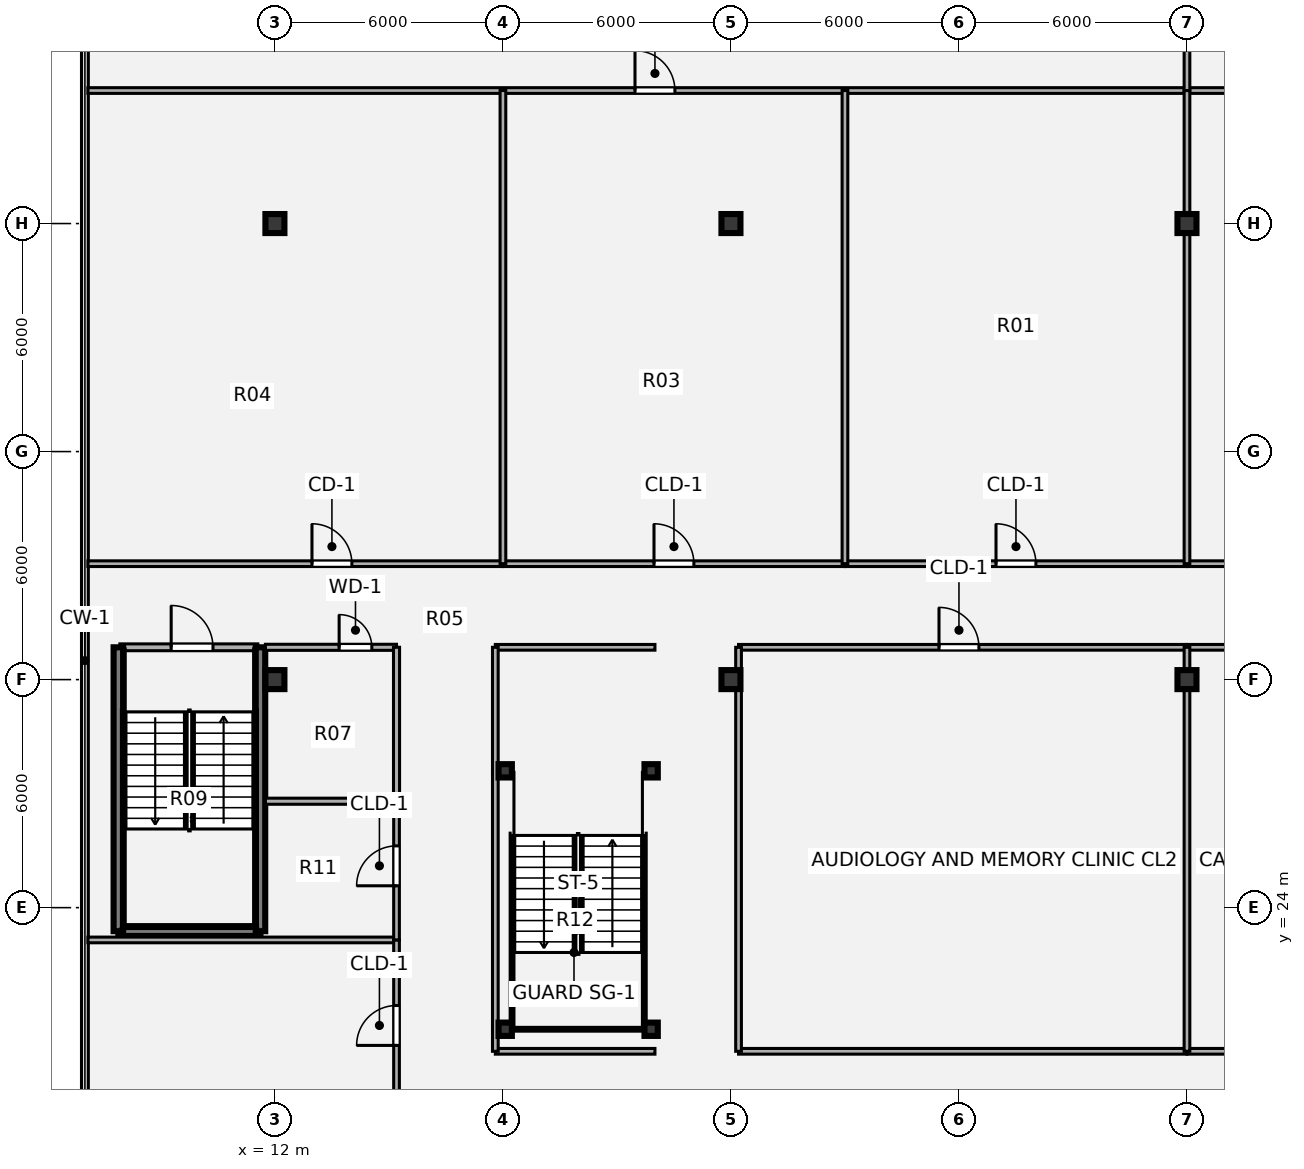
"""IFC4 building model, lengths in metres.
Left out: names, types, materials, properties, quantities, classifications, styles, units other than length and angle.
Written with IfcOpenShell. Run it as: python <this file> out.ifc"""

import sys

from ifc_helpers import new_model, si_unit, direction, frame, frame_2d, origin, origin_2d, place, context, subcontext, project, spatial, rectangle, hollow_rectangle, i_section, extrude, source, transform, mapped, element, fill, save


model = new_model("IFC4")
c1 = context("Model", 3, precision=1e-05, world=origin(), true_north=direction((0.0, 1.0)))
c2 = subcontext(c1, "Body", "Model", "MODEL_VIEW")
j1 = project(units=[si_unit("LENGTHUNIT", "METRE"), si_unit("PLANEANGLEUNIT", "RADIAN")], contexts=[c1])
p1 = place(None, origin())
s1 = spatial("IfcSite", under=j1, at=p1, CompositionType="ELEMENT")
p2 = place(p1, origin())
s2 = spatial("IfcBuilding", under=s1, at=p2, CompositionType="ELEMENT")
p3 = place(p2, frame((0.0, 0.0, 9.72)))
s3 = spatial("IfcBuildingStorey", under=s2, at=p3, CompositionType="ELEMENT", Elevation=9.72)
m1 = source(origin(), c2, "Body", "SweptSolid", [
    extrude(i_section(OverallWidth=0.5, OverallDepth=0.5, WebThickness=0.022, FlangeThickness=0.035, at=origin_2d()), origin(), (0.0, 0.0, 1.0), 4.32),
])
for number, where, z_axis, x_axis in (
    (1, (12.0, 30.0, 0.0), (0.0, 0.0, 1.0), (1.0, 0.0, 0.0)),
    (2, (24.0, 30.0, 0.0), (0.0, 0.0, 1.0), (1.0, 0.0, 0.0)),
    (3, (36.0, 30.0, 0.0), (0.0, 0.0, 1.0), (1.0, 0.0, 0.0)),
    (4, (12.0, 42.0, 0.0), (0.0, 0.0, 1.0), (1.0, 0.0, 0.0)),
    (5, (24.0, 42.0, 0.0), (0.0, 0.0, 1.0), (1.0, 0.0, 0.0)),
    (6, (36.0, 42.0, 0.0), (0.0, 0.0, 1.0), (1.0, 0.0, 0.0)),
):
    element("IfcColumn", number, at=place(p3, frame(where, z_axis=z_axis, x_axis=x_axis)), inside=s3, PredefinedType="COLUMN", context=c2, shape_type="MappedRepresentation", body=[
        mapped(m1, transform((0.0, 0.0, 0.0), x_axis=(1.0, 0.0, 0.0), y_axis=(0.0, 1.0, 0.0), z_axis=(0.0, 0.0, 1.0), scale=1.0)),
    ])
m2 = source(origin(), c2, "Body", "SweptSolid", [
    extrude(hollow_rectangle(XDim=0.35, YDim=0.35, WallThickness=0.016, OuterFilletRadius=0.032, at=origin_2d()), origin(), (0.0, 0.0, 1.0), 4.32),
])
for number, where, z_axis, x_axis in (
    (7, (18.06, 20.8, 0.0), (0.0, 0.0, 1.0), (1.0, 0.0, 0.0)),
    (8, (21.9, 20.8, 0.0), (0.0, 0.0, 1.0), (1.0, 0.0, 0.0)),
    (9, (18.06, 27.6, 0.0), (0.0, 0.0, 1.0), (1.0, 0.0, 0.0)),
    (10, (21.9, 27.6, 0.0), (0.0, 0.0, 1.0), (1.0, 0.0, 0.0)),
):
    element("IfcColumn", number, at=place(p3, frame(where, z_axis=z_axis, x_axis=x_axis)), inside=s3, PredefinedType="COLUMN", context=c2, shape_type="MappedRepresentation", body=[
        mapped(m2, transform((0.0, 0.0, 0.0), x_axis=(1.0, 0.0, 0.0), y_axis=(0.0, 1.0, 0.0), z_axis=(0.0, 0.0, 1.0), scale=1.0)),
    ])
p4 = place(p3, frame((7.92, 30.85, 0.0), z_axis=(0.0, 0.0, 1.0), x_axis=(1.0, 0.0, 0.0)))
e11 = element("IfcWall", 11, at=p4, inside=s3, PredefinedType="PARTITIONING", context=c2, shape_type="SweptSolid", body=[
    extrude(rectangle(XDim=3.63, YDim=0.18, at=frame_2d((1.815, 0.0))), origin(), (0.0, 0.0, 1.0), 4.04),
])
p5 = place(p4, frame((1.35, 0.0, 0.0)))
e12 = element("IfcOpeningElement", 12, at=p5, cuts=e11, PredefinedType="OPENING", context=c2, shape_type="SweptSolid", body=[
    extrude(rectangle(XDim=1.1, YDim=2.1, at=origin_2d()), frame((0.55, 0.1, 1.05), z_axis=(0.0, -1.0, 0.0), x_axis=(1.0, 0.0, 0.0)), (0.0, 0.0, 1.0), 0.2),
])
p6 = place(p3, frame((7.88, 23.38, 0.0), z_axis=(0.0, 0.0, 1.0), x_axis=(1.0, 0.0, 0.0)))
e13 = element("IfcWall", 13, at=p6, inside=s3, PredefinedType="SHEAR", context=c2, shape_type="SweptSolid", body=[
    extrude(rectangle(XDim=3.74, YDim=0.25, at=frame_2d((1.87, 0.0))), origin(), (0.0, 0.0, 1.0), 4.32),
])
for number, where, z_axis, x_axis in (
    (14, (7.88, 23.38, 0.0), (0.0, 0.0, 1.0), (0.0, 1.0, 0.0)),
    (15, (11.62, 23.38, 0.0), (0.0, 0.0, 1.0), (0.0, 1.0, 0.0)),
):
    element("IfcWall", number, at=place(p3, frame(where, z_axis=z_axis, x_axis=x_axis)), inside=s3, PredefinedType="SHEAR", context=c2, shape_type="SweptSolid", body=[
        extrude(rectangle(XDim=7.47, YDim=0.25, at=frame_2d((3.735, 0.0))), origin(), (0.0, 0.0, 1.0), 4.32),
    ])
p7 = place(p3, frame((17.8, 20.22, 0.0), z_axis=(0.0, 0.0, 1.0), x_axis=(1.0, 0.0, 0.0)))
e16 = element("IfcWall", 16, at=p7, inside=s3, PredefinedType="PARTITIONING", context=c2, shape_type="SweptSolid", body=[
    extrude(rectangle(XDim=4.2, YDim=0.15, at=frame_2d((2.1, 0.0))), origin(), (0.0, 0.0, 1.0), 4.01),
])
for number, where, z_axis, x_axis in (
    (17, (24.2, 20.22, 0.0), (0.0, 0.0, 1.0), (1.0, 0.0, 0.0)),
    (18, (36.0, 20.22, 0.0), (0.0, 0.0, 1.0), (1.0, 0.0, 0.0)),
):
    element("IfcWall", number, at=place(p3, frame(where, z_axis=z_axis, x_axis=x_axis)), inside=s3, PredefinedType="PARTITIONING", context=c2, shape_type="SweptSolid", body=[
        extrude(rectangle(XDim=11.8, YDim=0.15, at=frame_2d((5.9, 0.0))), origin(), (0.0, 0.0, 1.0), 4.01),
    ])
p8 = place(p3, frame((7.08, 23.15, 0.0), z_axis=(0.0, 0.0, 1.0), x_axis=(1.0, 0.0, 0.0)))
e19 = element("IfcWall", 19, at=p8, inside=s3, PredefinedType="PARTITIONING", context=c2, shape_type="SweptSolid", body=[
    extrude(rectangle(XDim=8.12, YDim=0.15, at=frame_2d((4.06, 0.0))), origin(), (0.0, 0.0, 1.0), 4.01),
])
p9 = place(p3, frame((11.75, 26.8, 0.0), z_axis=(0.0, 0.0, 1.0), x_axis=(1.0, 0.0, 0.0)))
e20 = element("IfcWall", 20, at=p9, inside=s3, PredefinedType="PLUMBINGWALL", context=c2, shape_type="SweptSolid", body=[
    extrude(rectangle(XDim=3.45, YDim=0.16, at=frame_2d((1.725, 0.0))), origin(), (0.0, 0.0, 1.0), 4.01),
])
p10 = place(p3, frame((11.75, 30.85, 0.0), z_axis=(0.0, 0.0, 1.0), x_axis=(1.0, 0.0, 0.0)))
e21 = element("IfcWall", 21, at=p10, inside=s3, PredefinedType="PLUMBINGWALL", context=c2, shape_type="SweptSolid", body=[
    extrude(rectangle(XDim=3.45, YDim=0.16, at=frame_2d((1.725, 0.0))), origin(), (0.0, 0.0, 1.0), 4.01),
])
p11 = place(p10, frame((1.94, 0.0, 0.0)))
e22 = element("IfcOpeningElement", 22, at=p11, cuts=e21, PredefinedType="OPENING", context=c2, shape_type="SweptSolid", body=[
    extrude(rectangle(XDim=0.86, YDim=2.1, at=origin_2d()), frame((0.43, 0.09, 1.05), z_axis=(0.0, -1.0, 0.0), x_axis=(1.0, 0.0, 0.0)), (0.0, 0.0, 1.0), 0.18),
])
p12 = place(p3, frame((17.8, 30.85, 0.0), z_axis=(0.0, 0.0, 1.0), x_axis=(1.0, 0.0, 0.0)))
e23 = element("IfcWall", 23, at=p12, inside=s3, PredefinedType="PARTITIONING", context=c2, shape_type="SweptSolid", body=[
    extrude(rectangle(XDim=4.2, YDim=0.15, at=frame_2d((2.1, 0.0))), origin(), (0.0, 0.0, 1.0), 4.01),
])
p13 = place(p3, frame((24.2, 30.85, 0.0), z_axis=(0.0, 0.0, 1.0), x_axis=(1.0, 0.0, 0.0)))
e24 = element("IfcWall", 24, at=p13, inside=s3, PredefinedType="PARTITIONING", context=c2, shape_type="SweptSolid", body=[
    extrude(rectangle(XDim=11.8, YDim=0.15, at=frame_2d((5.9, 0.0))), origin(), (0.0, 0.0, 1.0), 4.01),
])
p14 = place(p13, frame((5.275, 0.0, 0.0)))
e25 = element("IfcOpeningElement", 25, at=p14, cuts=e24, PredefinedType="OPENING", context=c2, shape_type="SweptSolid", body=[
    extrude(rectangle(XDim=1.05, YDim=2.1, at=origin_2d()), frame((0.525, 0.085, 1.05), z_axis=(0.0, -1.0, 0.0), x_axis=(1.0, 0.0, 0.0)), (0.0, 0.0, 1.0), 0.17),
])
p15 = place(p3, frame((36.0, 30.85, 0.0), z_axis=(0.0, 0.0, 1.0), x_axis=(1.0, 0.0, 0.0)))
e26 = element("IfcWall", 26, at=p15, inside=s3, PredefinedType="PARTITIONING", context=c2, shape_type="SweptSolid", body=[
    extrude(rectangle(XDim=11.8, YDim=0.15, at=frame_2d((5.9, 0.0))), origin(), (0.0, 0.0, 1.0), 4.01),
])
p16 = place(p15, frame((5.475, 0.0, 0.0)))
e27 = element("IfcOpeningElement", 27, at=p16, cuts=e26, PredefinedType="OPENING", context=c2, shape_type="SweptSolid", body=[
    extrude(rectangle(XDim=1.05, YDim=2.1, at=origin_2d()), frame((0.525, 0.085, 1.05), z_axis=(0.0, -1.0, 0.0), x_axis=(1.0, 0.0, 0.0)), (0.0, 0.0, 1.0), 0.17),
])
p17 = place(p3, frame((7.08, 33.05, 0.0), z_axis=(0.0, 0.0, 1.0), x_axis=(1.0, 0.0, 0.0)))
e28 = element("IfcWall", 28, at=p17, inside=s3, PredefinedType="PARTITIONING", context=c2, shape_type="SweptSolid", body=[
    extrude(rectangle(XDim=10.92, YDim=0.15, at=frame_2d((5.46, 0.0))), origin(), (0.0, 0.0, 1.0), 4.01),
])
p18 = place(p17, frame((5.895, 0.0, 0.0)))
e29 = element("IfcOpeningElement", 29, at=p18, cuts=e28, PredefinedType="OPENING", context=c2, shape_type="SweptSolid", body=[
    extrude(rectangle(XDim=1.05, YDim=2.1, at=origin_2d()), frame((0.525, 0.085, 1.05), z_axis=(0.0, -1.0, 0.0), x_axis=(1.0, 0.0, 0.0)), (0.0, 0.0, 1.0), 0.17),
])
p19 = place(p3, frame((18.0, 33.05, 0.0), z_axis=(0.0, 0.0, 1.0), x_axis=(1.0, 0.0, 0.0)))
e30 = element("IfcWall", 30, at=p19, inside=s3, PredefinedType="PARTITIONING", context=c2, shape_type="SweptSolid", body=[
    extrude(rectangle(XDim=9.0, YDim=0.15, at=frame_2d((4.5, 0.0))), origin(), (0.0, 0.0, 1.0), 4.01),
])
p20 = place(p19, frame((3.975, 0.0, 0.0)))
e31 = element("IfcOpeningElement", 31, at=p20, cuts=e30, PredefinedType="OPENING", context=c2, shape_type="SweptSolid", body=[
    extrude(rectangle(XDim=1.05, YDim=2.1, at=origin_2d()), frame((0.525, 0.085, 1.05), z_axis=(0.0, -1.0, 0.0), x_axis=(1.0, 0.0, 0.0)), (0.0, 0.0, 1.0), 0.17),
])
p21 = place(p3, frame((27.0, 33.05, 0.0), z_axis=(0.0, 0.0, 1.0), x_axis=(1.0, 0.0, 0.0)))
e32 = element("IfcWall", 32, at=p21, inside=s3, PredefinedType="PARTITIONING", context=c2, shape_type="SweptSolid", body=[
    extrude(rectangle(XDim=9.0, YDim=0.15, at=frame_2d((4.5, 0.0))), origin(), (0.0, 0.0, 1.0), 4.01),
])
p22 = place(p21, frame((3.975, 0.0, 0.0)))
e33 = element("IfcOpeningElement", 33, at=p22, cuts=e32, PredefinedType="OPENING", context=c2, shape_type="SweptSolid", body=[
    extrude(rectangle(XDim=1.05, YDim=2.1, at=origin_2d()), frame((0.525, 0.085, 1.05), z_axis=(0.0, -1.0, 0.0), x_axis=(1.0, 0.0, 0.0)), (0.0, 0.0, 1.0), 0.17),
])
p23 = place(p3, frame((36.0, 33.05, 0.0), z_axis=(0.0, 0.0, 1.0), x_axis=(1.0, 0.0, 0.0)))
e34 = element("IfcWall", 34, at=p23, inside=s3, PredefinedType="PARTITIONING", context=c2, shape_type="SweptSolid", body=[
    extrude(rectangle(XDim=9.0, YDim=0.15, at=frame_2d((4.5, 0.0))), origin(), (0.0, 0.0, 1.0), 4.01),
])
p24 = place(p23, frame((3.975, 0.0, 0.0)))
e35 = element("IfcOpeningElement", 35, at=p24, cuts=e34, PredefinedType="OPENING", context=c2, shape_type="SweptSolid", body=[
    extrude(rectangle(XDim=1.05, YDim=2.1, at=origin_2d()), frame((0.525, 0.085, 1.05), z_axis=(0.0, -1.0, 0.0), x_axis=(1.0, 0.0, 0.0)), (0.0, 0.0, 1.0), 0.17),
])
p25 = place(p3, frame((7.08, 45.5, 0.0), z_axis=(0.0, 0.0, 1.0), x_axis=(1.0, 0.0, 0.0)))
e36 = element("IfcWall", 36, at=p25, inside=s3, PredefinedType="PARTITIONING", context=c2, shape_type="SweptSolid", body=[
    extrude(rectangle(XDim=28.92, YDim=0.15, at=frame_2d((14.46, 0.0))), origin(), (0.0, 0.0, 1.0), 4.01),
])
p26 = place(p25, frame((14.395, 0.0, 0.0)))
e37 = element("IfcOpeningElement", 37, at=p26, cuts=e36, PredefinedType="OPENING", context=c2, shape_type="SweptSolid", body=[
    extrude(rectangle(XDim=1.05, YDim=2.1, at=origin_2d()), frame((0.525, 0.085, 1.05), z_axis=(0.0, -1.0, 0.0), x_axis=(1.0, 0.0, 0.0)), (0.0, 0.0, 1.0), 0.17),
])
p27 = place(p3, frame((36.0, 45.5, 0.0), z_axis=(0.0, 0.0, 1.0), x_axis=(1.0, 0.0, 0.0)))
e38 = element("IfcWall", 38, at=p27, inside=s3, PredefinedType="PARTITIONING", context=c2, shape_type="SweptSolid", body=[
    extrude(rectangle(XDim=28.92, YDim=0.15, at=frame_2d((14.46, 0.0))), origin(), (0.0, 0.0, 1.0), 4.01),
])
p28 = place(p27, frame((3.975, 0.0, 0.0)))
e39 = element("IfcOpeningElement", 39, at=p28, cuts=e38, PredefinedType="OPENING", context=c2, shape_type="SweptSolid", body=[
    extrude(rectangle(XDim=1.05, YDim=2.1, at=origin_2d()), frame((0.525, 0.085, 1.05), z_axis=(0.0, -1.0, 0.0), x_axis=(1.0, 0.0, 0.0)), (0.0, 0.0, 1.0), 0.17),
])
p29 = place(p3, frame((15.2, 6.2, 0.0), z_axis=(0.0, 0.0, 1.0), x_axis=(0.0, 1.0, 0.0)))
e40 = element("IfcWall", 40, at=p29, inside=s3, PredefinedType="PARTITIONING", context=c2, shape_type="SweptSolid", body=[
    extrude(rectangle(XDim=16.95, YDim=0.15, at=frame_2d((8.475, 0.0))), origin(), (0.0, 0.0, 1.0), 4.01),
])
p30 = place(p29, frame((14.175, 0.0, 0.0)))
e41 = element("IfcOpeningElement", 41, at=p30, cuts=e40, PredefinedType="OPENING", context=c2, shape_type="SweptSolid", body=[
    extrude(rectangle(XDim=1.05, YDim=2.1, at=origin_2d()), frame((0.525, 0.085, 1.05), z_axis=(0.0, -1.0, 0.0), x_axis=(1.0, 0.0, 0.0)), (0.0, 0.0, 1.0), 0.17),
])
p31 = place(p3, frame((15.2, 23.15, 0.0), z_axis=(0.0, 0.0, 1.0), x_axis=(0.0, 1.0, 0.0)))
e42 = element("IfcWall", 42, at=p31, inside=s3, PredefinedType="PARTITIONING", context=c2, shape_type="SweptSolid", body=[
    extrude(rectangle(XDim=3.65, YDim=0.15, at=frame_2d((1.825, 0.0))), origin(), (0.0, 0.0, 1.0), 4.01),
])
p32 = place(p31, frame((1.425, 0.0, 0.0)))
e43 = element("IfcOpeningElement", 43, at=p32, cuts=e42, PredefinedType="OPENING", context=c2, shape_type="SweptSolid", body=[
    extrude(rectangle(XDim=1.05, YDim=2.1, at=origin_2d()), frame((0.525, 0.085, 1.05), z_axis=(0.0, -1.0, 0.0), x_axis=(1.0, 0.0, 0.0)), (0.0, 0.0, 1.0), 0.17),
])
p33 = place(p3, frame((15.2, 26.8, 0.0), z_axis=(0.0, 0.0, 1.0), x_axis=(0.0, 1.0, 0.0)))
e44 = element("IfcWall", 44, at=p33, inside=s3, PredefinedType="PLUMBINGWALL", context=c2, shape_type="SweptSolid", body=[
    extrude(rectangle(XDim=4.05, YDim=0.16, at=frame_2d((2.025, 0.0))), origin(), (0.0, 0.0, 1.0), 3.666),
])
p34 = place(p3, frame((17.8, 20.22, 0.0), z_axis=(0.0, 0.0, 1.0), x_axis=(0.0, 1.0, 0.0)))
e45 = element("IfcWall", 45, at=p34, inside=s3, PredefinedType="PARTITIONING", context=c2, shape_type="SweptSolid", body=[
    extrude(rectangle(XDim=10.63, YDim=0.15, at=frame_2d((5.315, 0.0))), origin(), (0.0, 0.0, 1.0), 3.666),
])
p35 = place(p3, frame((18.0, 33.05, 0.0), z_axis=(0.0, 0.0, 1.0), x_axis=(0.0, 1.0, 0.0)))
e46 = element("IfcWall", 46, at=p35, inside=s3, PredefinedType="PARTITIONING", context=c2, shape_type="SweptSolid", body=[
    extrude(rectangle(XDim=12.45, YDim=0.15, at=frame_2d((6.225, 0.0))), origin(), (0.0, 0.0, 1.0), 3.666),
])
p36 = place(p3, frame((24.2, 20.22, 0.0), z_axis=(0.0, 0.0, 1.0), x_axis=(0.0, 1.0, 0.0)))
e47 = element("IfcWall", 47, at=p36, inside=s3, PredefinedType="PARTITIONING", context=c2, shape_type="SweptSolid", body=[
    extrude(rectangle(XDim=10.63, YDim=0.15, at=frame_2d((5.315, 0.0))), origin(), (0.0, 0.0, 1.0), 3.225),
])
p37 = place(p3, frame((27.0, 33.05, 0.0), z_axis=(0.0, 0.0, 1.0), x_axis=(0.0, 1.0, 0.0)))
e48 = element("IfcWall", 48, at=p37, inside=s3, PredefinedType="PARTITIONING", context=c2, shape_type="SweptSolid", body=[
    extrude(rectangle(XDim=12.45, YDim=0.15, at=frame_2d((6.225, 0.0))), origin(), (0.0, 0.0, 1.0), 3.666),
])
p38 = place(p3, frame((36.0, 20.22, 0.0), z_axis=(0.0, 0.0, 1.0), x_axis=(0.0, 1.0, 0.0)))
e49 = element("IfcWall", 49, at=p38, inside=s3, PredefinedType="PARTITIONING", context=c2, shape_type="SweptSolid", body=[
    extrude(rectangle(XDim=10.63, YDim=0.15, at=frame_2d((5.315, 0.0))), origin(), (0.0, 0.0, 1.0), 3.225),
])
p39 = place(p3, frame((36.0, 33.05, 0.0), z_axis=(0.0, 0.0, 1.0), x_axis=(0.0, 1.0, 0.0)))
e50 = element("IfcWall", 50, at=p39, inside=s3, PredefinedType="PARTITIONING", context=c2, shape_type="SweptSolid", body=[
    extrude(rectangle(XDim=12.45, YDim=0.15, at=frame_2d((6.225, 0.0))), origin(), (0.0, 0.0, 1.0), 3.225),
])
p40 = place(p3, frame((36.0, 45.5, 0.0), z_axis=(0.0, 0.0, 1.0), x_axis=(0.0, 1.0, 0.0)))
e51 = element("IfcWall", 51, at=p40, inside=s3, PredefinedType="PARTITIONING", context=c2, shape_type="SweptSolid", body=[
    extrude(rectangle(XDim=13.02, YDim=0.15, at=frame_2d((6.51, 0.0))), origin(), (0.0, 0.0, 1.0), 3.225),
])
m3 = source(origin(), c2, "Body", "SweptSolid", [
    extrude(rectangle(XDim=1.1, YDim=2.1, at=origin_2d()), frame((0.55, 0.025, 1.05), z_axis=(0.0, -1.0, 0.0), x_axis=(1.0, 0.0, 0.0)), (0.0, 0.0, 1.0), 0.05),
])
p41 = place(p5, origin())
e52 = element("IfcDoor", 52, at=p41, inside=s3, OperationType="SINGLE_SWING_LEFT", PredefinedType="DOOR", context=c2, shape_type="MappedRepresentation", body=[
    mapped(m3, transform((0.0, 0.0, 0.0), x_axis=(1.0, 0.0, 0.0), y_axis=(0.0, 1.0, 0.0), z_axis=(0.0, 0.0, 1.0), scale=1.0)),
])
fill(e12, e52)
m4 = source(origin(), c2, "Body", "SweptSolid", [
    extrude(rectangle(XDim=0.86, YDim=2.1, at=origin_2d()), frame((0.43, 0.025, 1.05), z_axis=(0.0, -1.0, 0.0), x_axis=(1.0, 0.0, 0.0)), (0.0, 0.0, 1.0), 0.05),
])
p42 = place(p11, origin())
e53 = element("IfcDoor", 53, at=p42, inside=s3, OperationType="SINGLE_SWING_LEFT", PredefinedType="DOOR", context=c2, shape_type="MappedRepresentation", body=[
    mapped(m4, transform((0.0, 0.0, 0.0), x_axis=(1.0, 0.0, 0.0), y_axis=(0.0, 1.0, 0.0), z_axis=(0.0, 0.0, 1.0), scale=1.0)),
])
fill(e22, e53)
m5 = source(origin(), c2, "Body", "SweptSolid", [
    extrude(rectangle(XDim=1.05, YDim=2.1, at=origin_2d()), frame((0.525, 0.025, 1.05), z_axis=(0.0, -1.0, 0.0), x_axis=(1.0, 0.0, 0.0)), (0.0, 0.0, 1.0), 0.05),
])
p43 = place(p14, origin())
e54 = element("IfcDoor", 54, at=p43, inside=s3, OperationType="SINGLE_SWING_LEFT", PredefinedType="DOOR", context=c2, shape_type="MappedRepresentation", body=[
    mapped(m5, transform((0.0, 0.0, 0.0), x_axis=(1.0, 0.0, 0.0), y_axis=(0.0, 1.0, 0.0), z_axis=(0.0, 0.0, 1.0), scale=1.0)),
])
fill(e25, e54)
m6 = source(origin(), c2, "Body", "SweptSolid", [
    extrude(rectangle(XDim=1.05, YDim=2.1, at=origin_2d()), frame((0.525, 0.025, 1.05), z_axis=(0.0, -1.0, 0.0), x_axis=(1.0, 0.0, 0.0)), (0.0, 0.0, 1.0), 0.05),
])
p44 = place(p18, origin())
e55 = element("IfcDoor", 55, at=p44, inside=s3, OperationType="SINGLE_SWING_LEFT", PredefinedType="DOOR", context=c2, shape_type="MappedRepresentation", body=[
    mapped(m6, transform((0.0, 0.0, 0.0), x_axis=(1.0, 0.0, 0.0), y_axis=(0.0, 1.0, 0.0), z_axis=(0.0, 0.0, 1.0), scale=1.0)),
])
fill(e29, e55)
p45 = place(p20, origin())
e56 = element("IfcDoor", 56, at=p45, inside=s3, OperationType="SINGLE_SWING_LEFT", PredefinedType="DOOR", context=c2, shape_type="MappedRepresentation", body=[
    mapped(m5, transform((0.0, 0.0, 0.0), x_axis=(1.0, 0.0, 0.0), y_axis=(0.0, 1.0, 0.0), z_axis=(0.0, 0.0, 1.0), scale=1.0)),
])
fill(e31, e56)
p46 = place(p22, origin())
e57 = element("IfcDoor", 57, at=p46, inside=s3, OperationType="SINGLE_SWING_LEFT", PredefinedType="DOOR", context=c2, shape_type="MappedRepresentation", body=[
    mapped(m5, transform((0.0, 0.0, 0.0), x_axis=(1.0, 0.0, 0.0), y_axis=(0.0, 1.0, 0.0), z_axis=(0.0, 0.0, 1.0), scale=1.0)),
])
fill(e33, e57)
p47 = place(p26, origin())
e58 = element("IfcDoor", 58, at=p47, inside=s3, OperationType="SINGLE_SWING_LEFT", PredefinedType="DOOR", context=c2, shape_type="MappedRepresentation", body=[
    mapped(m5, transform((0.0, 0.0, 0.0), x_axis=(1.0, 0.0, 0.0), y_axis=(0.0, 1.0, 0.0), z_axis=(0.0, 0.0, 1.0), scale=1.0)),
])
fill(e37, e58)
p48 = place(p30, origin())
e59 = element("IfcDoor", 59, at=p48, inside=s3, OperationType="SINGLE_SWING_LEFT", PredefinedType="DOOR", context=c2, shape_type="MappedRepresentation", body=[
    mapped(m5, transform((0.0, 0.0, 0.0), x_axis=(1.0, 0.0, 0.0), y_axis=(0.0, 1.0, 0.0), z_axis=(0.0, 0.0, 1.0), scale=1.0)),
])
fill(e41, e59)
p49 = place(p32, origin())
e60 = element("IfcDoor", 60, at=p49, inside=s3, OperationType="SINGLE_SWING_LEFT", PredefinedType="DOOR", context=c2, shape_type="MappedRepresentation", body=[
    mapped(m5, transform((0.0, 0.0, 0.0), x_axis=(1.0, 0.0, 0.0), y_axis=(0.0, 1.0, 0.0), z_axis=(0.0, 0.0, 1.0), scale=1.0)),
])
fill(e43, e60)
save(model, sys.argv[1])
